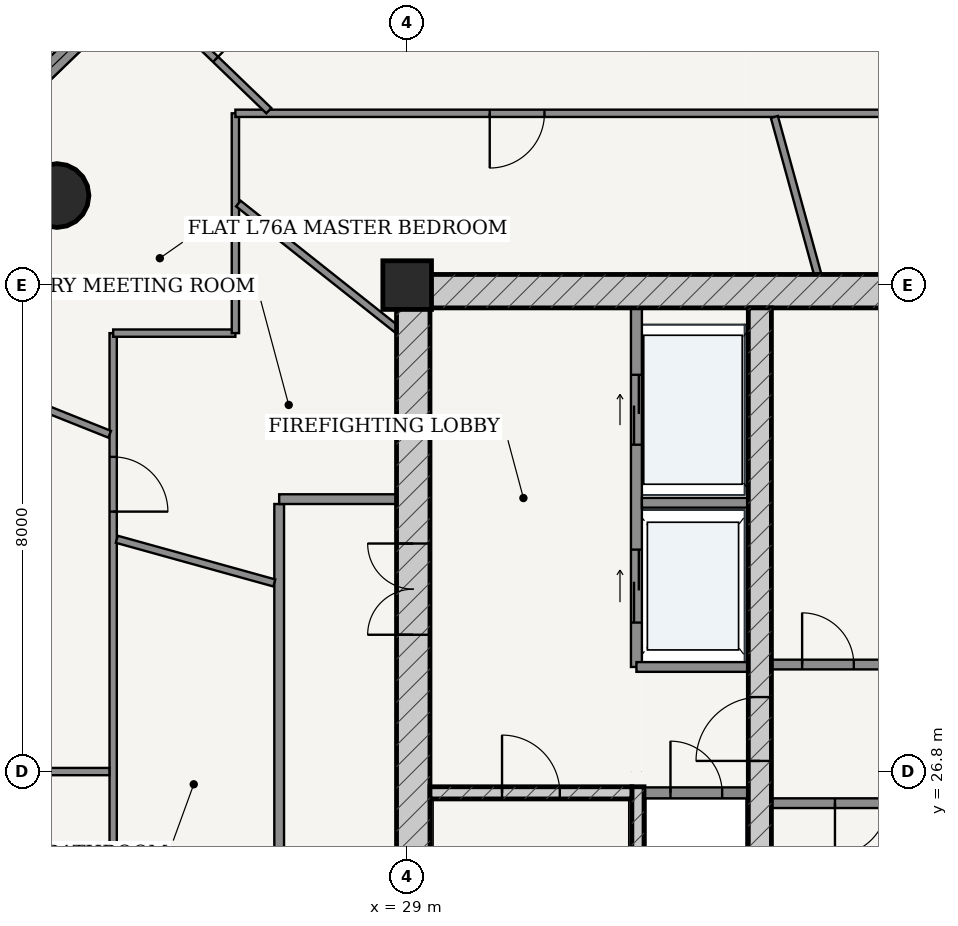
"""IFC4 building model, lengths in metres.
Left out: names, types, materials, properties, quantities, classifications, styles, units other than length and angle.
Written with IfcOpenShell. Run it as: python <this file> out.ifc"""

import sys

from ifc_helpers import new_model, si_unit, direction, frame, frame_2d, origin, origin_2d, place, context, subcontext, project, spatial, rectangle, hollow_circle, extrude, source, transform, mapped, element, fill, save


model = new_model("IFC4")
c1 = context("Model", 3, precision=1e-05, world=origin(), true_north=direction((-0.2419218956, 0.970295726276)))
c2 = subcontext(c1, "Body", "Model", "MODEL_VIEW")
j1 = project(units=[si_unit("LENGTHUNIT", "METRE"), si_unit("PLANEANGLEUNIT", "RADIAN")], contexts=[c1])
p1 = place(None, origin())
s1 = spatial("IfcSite", under=j1, at=p1, CompositionType="ELEMENT")
p2 = place(p1, origin())
s2 = spatial("IfcBuilding", under=s1, at=p2, CompositionType="ELEMENT")
p3 = place(p2, frame((0.0, 0.0, 289.45)))
s3 = spatial("IfcBuildingStorey", under=s2, at=p3, CompositionType="ELEMENT", Elevation=289.45)
p4 = place(p3, frame((29.0, 34.8, 0.0), z_axis=(0.0, 0.0, 1.0), x_axis=(1.0, 0.0, 0.0)))
e1 = element("IfcColumn", 1, at=p4, inside=s3, PredefinedType="COLUMN", context=c2, shape_type="SweptSolid", body=[
    extrude(rectangle(XDim=0.8, YDim=0.8, at=origin_2d()), origin(), (0.0, 0.0, 1.0), 3.75),
])
p5 = place(p3, frame((28.825, 34.7, 0.0), z_axis=(0.0, 0.0, 1.0), x_axis=(1.0, 0.0, 0.0)))
e2 = element("IfcWall", 2, at=p5, inside=s3, PredefinedType="SHEAR", context=c2, shape_type="SweptSolid", body=[
    extrude(rectangle(XDim=18.35, YDim=0.55, at=frame_2d((9.175, 0.0))), origin(), (0.0, 0.0, 1.0), 3.49),
])
p6 = place(p3, frame((29.1, 19.175, 0.0), z_axis=(0.0, 0.0, 1.0), x_axis=(0.0, 1.0, 0.0)))
e3 = element("IfcWall", 3, at=p6, inside=s3, PredefinedType="SHEAR", context=c2, shape_type="SweptSolid", body=[
    extrude(rectangle(XDim=15.25, YDim=0.55, at=frame_2d((7.625, 0.0))), origin(), (0.0, 0.0, 1.0), 3.49),
])
p7 = place(p6, frame((9.875, 0.0, 0.0)))
e4 = element("IfcOpeningElement", 4, at=p7, cuts=e3, PredefinedType="OPENING", context=c2, shape_type="SweptSolid", body=[
    extrude(rectangle(XDim=1.5, YDim=2.2, at=frame_2d((0.75, 1.1))), frame((0.0, 0.285, 0.0), z_axis=(0.0, -1.0, 0.0), x_axis=(1.0, 0.0, 0.0)), (0.0, 0.0, 1.0), 0.57),
])
p8 = place(p3, frame((32.795, 19.175, 0.0), z_axis=(0.0, 0.0, 1.0), x_axis=(0.0, 1.0, 0.0)))
e5 = element("IfcWall", 5, at=p8, inside=s3, PredefinedType="SOLIDWALL", context=c2, shape_type="SweptSolid", body=[
    extrude(rectangle(XDim=7.375, YDim=0.2, at=frame_2d((3.688, 0.0))), origin(), (0.0, 0.0, 1.0), 3.49),
])
p9 = place(p3, frame((29.375, 26.45, 0.0), z_axis=(0.0, 0.0, 1.0), x_axis=(1.0, 0.0, 0.0)))
e6 = element("IfcWall", 6, at=p9, inside=s3, PredefinedType="SOLIDWALL", context=c2, shape_type="SweptSolid", body=[
    extrude(rectangle(XDim=3.32, YDim=0.2, at=frame_2d((1.66, 0.0))), origin(), (0.0, 0.0, 1.0), 3.49),
])
p10 = place(p9, frame((1.185, 0.0, 0.0)))
e7 = element("IfcOpeningElement", 7, at=p10, cuts=e6, PredefinedType="OPENING", context=c2, shape_type="SweptSolid", body=[
    extrude(rectangle(XDim=0.95, YDim=2.15, at=frame_2d((0.475, 1.075))), frame((0.0, 0.11, 0.0), z_axis=(0.0, -1.0, 0.0), x_axis=(1.0, 0.0, 0.0)), (0.0, 0.0, 1.0), 0.22),
])
p11 = place(p3, frame((34.8, 19.175, 0.0), z_axis=(0.0, 0.0, 1.0), x_axis=(0.0, 1.0, 0.0)))
e8 = element("IfcWall", 8, at=p11, inside=s3, PredefinedType="SHEAR", context=c2, shape_type="SweptSolid", body=[
    extrude(rectangle(XDim=15.25, YDim=0.38, at=frame_2d((7.625, 0.0))), origin(), (0.0, 0.0, 1.0), 3.49),
])
p12 = place(p11, frame((7.8, 0.0, 0.0)))
e9 = element("IfcOpeningElement", 9, at=p12, cuts=e8, PredefinedType="OPENING", context=c2, shape_type="SweptSolid", body=[
    extrude(rectangle(XDim=1.05, YDim=2.15, at=frame_2d((0.525, 1.075))), frame((0.0, 0.2, 0.0), z_axis=(0.0, -1.0, 0.0), x_axis=(1.0, 0.0, 0.0)), (0.0, 0.0, 1.0), 0.4),
])
p13 = place(p3, frame((23.241, 36.272, 0.0), z_axis=(0.0, 0.0, 1.0), x_axis=(1.0, 0.0, 0.0)))
e10 = element("IfcColumn", 10, at=p13, inside=s3, PredefinedType="COLUMN", context=c2, shape_type="SweptSolid", body=[
    extrude(hollow_circle(Radius=0.525, WallThickness=0.035, at=origin_2d()), origin(), (0.0, 0.0, 1.0), 3.75),
])
p14 = place(p3, frame((27.296, 42.379, 0.0), z_axis=(0.0, 0.0, 1.0), x_axis=(-0.719979309073, -0.693995529169, 0.0)))
e11 = element("IfcWall", 11, at=p14, inside=s3, PredefinedType="SOLIDWALL", context=c2, shape_type="SweptSolid", body=[
    extrude(rectangle(XDim=7.583, YDim=0.28, at=frame_2d((3.791, 0.0))), origin(), (0.0, 0.0, 1.0), 3.49),
])
p15 = place(p14, frame((1.272, 0.0, 0.85)))
e12 = element("IfcOpeningElement", 12, at=p15, cuts=e11, PredefinedType="OPENING", context=c2, shape_type="SweptSolid", body=[
    extrude(rectangle(XDim=1.55, YDim=1.95, at=frame_2d((0.775, 0.975))), frame((0.0, 0.15, 0.0), z_axis=(0.0, -1.0, 0.0), x_axis=(1.0, 0.0, 0.0)), (0.0, 0.0, 1.0), 0.3),
])
p16 = place(p14, frame((4.76, 0.0, 0.85)))
e13 = element("IfcOpeningElement", 13, at=p16, cuts=e11, PredefinedType="OPENING", context=c2, shape_type="SweptSolid", body=[
    extrude(rectangle(XDim=1.55, YDim=1.95, at=frame_2d((0.775, 0.975))), frame((0.0, 0.15, 0.0), z_axis=(0.0, -1.0, 0.0), x_axis=(1.0, 0.0, 0.0)), (0.0, 0.0, 1.0), 0.3),
])
p17 = place(p3, frame((32.9, 26.45, 0.0), z_axis=(0.0, 0.0, 1.0), x_axis=(1.0, 0.0, 0.0)))
e14 = element("IfcWall", 14, at=p17, inside=s3, PredefinedType="PARTITIONING", context=c2, shape_type="SweptSolid", body=[
    extrude(rectangle(XDim=1.71, YDim=0.18, at=frame_2d((0.855, 0.0))), origin(), (0.0, 0.0, 1.0), 3.49),
])
p18 = place(p17, frame((0.43, 0.0, 0.0)))
e15 = element("IfcOpeningElement", 15, at=p18, cuts=e14, PredefinedType="OPENING", context=c2, shape_type="SweptSolid", body=[
    extrude(rectangle(XDim=0.85, YDim=2.1, at=frame_2d((0.425, 1.05))), frame((0.0, 0.1, 0.0), z_axis=(0.0, -1.0, 0.0), x_axis=(1.0, 0.0, 0.0)), (0.0, 0.0, 1.0), 0.2),
])
p19 = place(p3, frame((32.77, 28.52, 0.0), z_axis=(0.0, 0.0, 1.0), x_axis=(0.0, 1.0, 0.0)))
e16 = element("IfcWall", 16, at=p19, inside=s3, PredefinedType="PARTITIONING", context=c2, shape_type="SweptSolid", body=[
    extrude(rectangle(XDim=5.905, YDim=0.18, at=frame_2d((2.953, 0.0))), origin(), (0.0, 0.0, 1.0), 3.49),
])
p20 = place(p19, frame((3.655, 0.0, 0.0)))
e17 = element("IfcOpeningElement", 17, at=p20, cuts=e16, PredefinedType="OPENING", context=c2, shape_type="SweptSolid", body=[
    extrude(rectangle(XDim=1.15, YDim=2.2, at=frame_2d((0.575, 1.1))), frame((0.0, 0.1, 0.0), z_axis=(0.0, -1.0, 0.0), x_axis=(1.0, 0.0, 0.0)), (0.0, 0.0, 1.0), 0.2),
])
p21 = place(p19, frame((0.73, 0.0, 0.0)))
e18 = element("IfcOpeningElement", 18, at=p21, cuts=e16, PredefinedType="OPENING", context=c2, shape_type="SweptSolid", body=[
    extrude(rectangle(XDim=1.2, YDim=2.25, at=frame_2d((0.6, 1.125))), frame((0.0, 0.1, 0.0), z_axis=(0.0, -1.0, 0.0), x_axis=(1.0, 0.0, 0.0)), (0.0, 0.0, 1.0), 0.2),
])
p22 = place(p3, frame((32.86, 31.22, 0.0), z_axis=(0.0, 0.0, 1.0), x_axis=(1.0, 0.0, 0.0)))
e19 = element("IfcWall", 19, at=p22, inside=s3, PredefinedType="PARTITIONING", context=c2, shape_type="SweptSolid", body=[
    extrude(rectangle(XDim=1.75, YDim=0.16, at=frame_2d((0.875, 0.0))), origin(), (0.0, 0.0, 1.0), 3.49),
])
p23 = place(p3, frame((32.77, 28.52, 0.0), z_axis=(0.0, 0.0, 1.0), x_axis=(1.0, 0.0, 0.0)))
e20 = element("IfcWall", 20, at=p23, inside=s3, PredefinedType="PARTITIONING", context=c2, shape_type="SweptSolid", body=[
    extrude(rectangle(XDim=1.84, YDim=0.16, at=frame_2d((0.92, 0.0))), origin(), (0.0, 0.0, 1.0), 3.49),
])
p24 = place(p3, frame((34.99, 28.56, 0.0), z_axis=(0.0, 0.0, 1.0), x_axis=(1.0, 0.0, 0.0)))
e21 = element("IfcWall", 21, at=p24, inside=s3, PredefinedType="PARTITIONING", context=c2, shape_type="SweptSolid", body=[
    extrude(rectangle(XDim=6.02, YDim=0.16, at=frame_2d((3.01, 0.0))), origin(), (0.0, 0.0, 1.0), 3.49),
])
p25 = place(p24, frame((0.505, 0.0, 0.0)))
e22 = element("IfcOpeningElement", 22, at=p25, cuts=e21, PredefinedType="OPENING", context=c2, shape_type="SweptSolid", body=[
    extrude(rectangle(XDim=0.85, YDim=2.1, at=frame_2d((0.425, 1.05))), frame((0.0, 0.09, 0.0), z_axis=(0.0, -1.0, 0.0), x_axis=(1.0, 0.0, 0.0)), (0.0, 0.0, 1.0), 0.18),
])
p26 = place(p24, frame((2.58, 0.0, 0.0)))
e23 = element("IfcOpeningElement", 23, at=p26, cuts=e21, PredefinedType="OPENING", context=c2, shape_type="SweptSolid", body=[
    extrude(rectangle(XDim=0.86, YDim=2.1, at=frame_2d((0.43, 1.05))), frame((0.0, 0.09, 0.0), z_axis=(0.0, -1.0, 0.0), x_axis=(1.0, 0.0, 0.0)), (0.0, 0.0, 1.0), 0.18),
])
p27 = place(p24, frame((4.665, 0.0, 0.0)))
e24 = element("IfcOpeningElement", 24, at=p27, cuts=e21, PredefinedType="OPENING", context=c2, shape_type="SweptSolid", body=[
    extrude(rectangle(XDim=0.85, YDim=2.1, at=frame_2d((0.425, 1.05))), frame((0.0, 0.09, 0.0), z_axis=(0.0, -1.0, 0.0), x_axis=(1.0, 0.0, 0.0)), (0.0, 0.0, 1.0), 0.18),
])
p28 = place(p3, frame((34.99, 26.28, 0.0), z_axis=(0.0, 0.0, 1.0), x_axis=(1.0, 0.0, 0.0)))
e25 = element("IfcWall", 25, at=p28, inside=s3, PredefinedType="PARTITIONING", context=c2, shape_type="SweptSolid", body=[
    extrude(rectangle(XDim=6.02, YDim=0.16, at=frame_2d((3.01, 0.0))), origin(), (0.0, 0.0, 1.0), 3.49),
])
p29 = place(p28, frame((1.045, 0.0, 0.0)))
e26 = element("IfcOpeningElement", 26, at=p29, cuts=e25, PredefinedType="OPENING", context=c2, shape_type="SweptSolid", body=[
    extrude(rectangle(XDim=0.85, YDim=2.1, at=frame_2d((0.425, 1.05))), frame((0.0, 0.09, 0.0), z_axis=(0.0, -1.0, 0.0), x_axis=(1.0, 0.0, 0.0)), (0.0, 0.0, 1.0), 0.18),
])
p30 = place(p28, frame((3.215, 0.0, 0.0)))
e27 = element("IfcOpeningElement", 27, at=p30, cuts=e25, PredefinedType="OPENING", context=c2, shape_type="SweptSolid", body=[
    extrude(rectangle(XDim=1.1, YDim=2.2, at=frame_2d((0.55, 1.1))), frame((0.0, 0.09, 0.0), z_axis=(0.0, -1.0, 0.0), x_axis=(1.0, 0.0, 0.0)), (0.0, 0.0, 1.0), 0.18),
])
p31 = place(p28, frame((4.695, 0.0, 0.0)))
e28 = element("IfcOpeningElement", 28, at=p31, cuts=e25, PredefinedType="OPENING", context=c2, shape_type="SweptSolid", body=[
    extrude(rectangle(XDim=1.1, YDim=2.2, at=frame_2d((0.55, 1.1))), frame((0.0, 0.09, 0.0), z_axis=(0.0, -1.0, 0.0), x_axis=(1.0, 0.0, 0.0)), (0.0, 0.0, 1.0), 0.18),
])
p32 = place(p3, frame((26.895, 17.275, 0.0), z_axis=(0.0, 0.0, 1.0), x_axis=(0.0, 1.0, 0.0)))
e29 = element("IfcWall", 29, at=p32, inside=s3, PredefinedType="PARTITIONING", context=c2, shape_type="SweptSolid", body=[
    extrude(rectangle(XDim=13.925, YDim=0.16, at=frame_2d((6.962, 0.0))), origin(), (0.0, 0.0, 1.0), 3.015),
])
p33 = place(p32, frame((2.321, 0.0, 0.0)))
e30 = element("IfcOpeningElement", 30, at=p33, cuts=e29, PredefinedType="OPENING", context=c2, shape_type="SweptSolid", body=[
    extrude(rectangle(XDim=0.98, YDim=2.2, at=frame_2d((0.49, 1.1))), frame((0.0, 0.09, 0.0), z_axis=(0.0, -1.0, 0.0), x_axis=(1.0, 0.0, 0.0)), (0.0, 0.0, 1.0), 0.18),
])
p34 = place(p3, frame((26.895, 31.28, 0.0), z_axis=(0.0, 0.0, 1.0), x_axis=(1.0, 0.0, 0.0)))
e31 = element("IfcWall", 31, at=p34, inside=s3, PredefinedType="PARTITIONING", context=c2, shape_type="SweptSolid", body=[
    extrude(rectangle(XDim=1.93, YDim=0.16, at=frame_2d((0.965, 0.0))), origin(), (0.0, 0.0, 1.0), 3.49),
])
p35 = place(p3, frame((24.165, 14.465, 0.0), z_axis=(0.0, 0.0, 1.0), x_axis=(0.0, 1.0, 0.0)))
e32 = element("IfcWall", 32, at=p35, inside=s3, PredefinedType="PARTITIONING", context=c2, shape_type="SweptSolid", body=[
    extrude(rectangle(XDim=19.545, YDim=0.12, at=frame_2d((9.772, 0.0))), origin(), (0.0, 0.0, 1.0), 3.015),
])
p36 = place(p35, frame((4.875, 0.0, 0.0)))
e33 = element("IfcOpeningElement", 33, at=p36, cuts=e32, PredefinedType="OPENING", context=c2, shape_type="SweptSolid", body=[
    extrude(rectangle(XDim=0.9, YDim=2.15, at=frame_2d((0.45, 1.075))), frame((0.0, 0.07, 0.0), z_axis=(0.0, -1.0, 0.0), x_axis=(1.0, 0.0, 0.0)), (0.0, 0.0, 1.0), 0.14),
])
p37 = place(p35, frame((16.61, 0.0, 0.0)))
e34 = element("IfcOpeningElement", 34, at=p37, cuts=e32, PredefinedType="OPENING", context=c2, shape_type="SweptSolid", body=[
    extrude(rectangle(XDim=0.9, YDim=2.15, at=frame_2d((0.45, 1.075))), frame((0.0, 0.07, 0.0), z_axis=(0.0, -1.0, 0.0), x_axis=(1.0, 0.0, 0.0)), (0.0, 0.0, 1.0), 0.14),
])
p38 = place(p3, frame((24.165, 34.01, 0.0), z_axis=(0.0, 0.0, 1.0), x_axis=(1.0, 0.0, 0.0)))
e35 = element("IfcWall", 35, at=p38, inside=s3, PredefinedType="PARTITIONING", context=c2, shape_type="SweptSolid", body=[
    extrude(rectangle(XDim=2.01, YDim=0.12, at=frame_2d((1.005, 0.0))), origin(), (0.0, 0.0, 1.0), 3.209),
])
p39 = place(p3, frame((26.175, 34.01, 0.0), z_axis=(0.0, 0.0, 1.0), x_axis=(0.0, 1.0, 0.0)))
e36 = element("IfcWall", 36, at=p39, inside=s3, PredefinedType="PARTITIONING", context=c2, shape_type="SweptSolid", body=[
    extrude(rectangle(XDim=3.615, YDim=0.12, at=frame_2d((1.808, 0.0))), origin(), (0.0, 0.0, 1.0), 3.015),
])
p40 = place(p3, frame((26.175, 37.625, 0.0), z_axis=(0.0, 0.0, 1.0), x_axis=(1.0, 0.0, 0.0)))
e37 = element("IfcWall", 37, at=p40, inside=s3, PredefinedType="PARTITIONING", context=c2, shape_type="SweptSolid", body=[
    extrude(rectangle(XDim=13.957, YDim=0.12, at=frame_2d((6.979, 0.0))), origin(), (0.0, 0.0, 1.0), 3.015),
])
p41 = place(p40, frame((10.852, 0.0, 0.0)))
e38 = element("IfcOpeningElement", 38, at=p41, cuts=e37, PredefinedType="OPENING", context=c2, shape_type="SweptSolid", body=[
    extrude(rectangle(XDim=0.86, YDim=2.15, at=frame_2d((0.43, 1.075))), frame((0.0, 0.07, 0.0), z_axis=(0.0, -1.0, 0.0), x_axis=(1.0, 0.0, 0.0)), (0.0, 0.0, 1.0), 0.14),
])
p42 = place(p40, frame((4.183, 0.0, 0.0)))
e39 = element("IfcOpeningElement", 39, at=p42, cuts=e37, PredefinedType="OPENING", context=c2, shape_type="SweptSolid", body=[
    extrude(rectangle(XDim=0.9, YDim=2.15, at=frame_2d((0.45, 1.075))), frame((0.0, 0.07, 0.0), z_axis=(0.0, -1.0, 0.0), x_axis=(1.0, 0.0, 0.0)), (0.0, 0.0, 1.0), 0.14),
])
p43 = place(p3, frame((26.725, 37.668, 0.0), z_axis=(0.0, 0.0, 1.0), x_axis=(-0.719954096891, 0.694021684366, 0.0)))
e40 = element("IfcWall", 40, at=p43, inside=s3, PredefinedType="PARTITIONING", context=c2, shape_type="SweptSolid", body=[
    extrude(rectangle(XDim=3.333, YDim=0.12, at=frame_2d((1.667, 0.0))), origin(), (0.0, 0.0, 1.0), 3.121),
])
p44 = place(p43, frame((1.216, 0.0, 0.0)))
e41 = element("IfcOpeningElement", 41, at=p44, cuts=e40, PredefinedType="OPENING", context=c2, shape_type="SweptSolid", body=[
    extrude(rectangle(XDim=0.9, YDim=2.15, at=frame_2d((0.45, 1.075))), frame((0.0, 0.07, 0.0), z_axis=(0.0, -1.0, 0.0), x_axis=(1.0, 0.0, 0.0)), (0.0, 0.0, 1.0), 0.14),
])
p45 = place(p3, frame((24.107, 32.347, 0.0), z_axis=(0.0, 0.0, 1.0), x_axis=(-0.928712556691, 0.370800467966, 0.0)))
e42 = element("IfcWall", 42, at=p45, inside=s3, PredefinedType="PARTITIONING", context=c2, shape_type="SweptSolid", body=[
    extrude(rectangle(XDim=4.28, YDim=0.12, at=frame_2d((2.14, 0.0))), origin(), (0.0, 0.0, 1.0), 3.121),
])
p46 = place(p45, frame((1.69, 0.0, 0.0)))
e43 = element("IfcOpeningElement", 43, at=p46, cuts=e42, PredefinedType="OPENING", context=c2, shape_type="SweptSolid", body=[
    extrude(rectangle(XDim=0.9, YDim=2.15, at=frame_2d((0.45, 1.075))), frame((0.0, 0.07, 0.0), z_axis=(0.0, -1.0, 0.0), x_axis=(1.0, 0.0, 0.0)), (0.0, 0.0, 1.0), 0.14),
])
p47 = place(p3, frame((24.103, 26.8, 0.0), z_axis=(0.0, 0.0, 1.0), x_axis=(-1.0, 0.0, 0.0)))
e44 = element("IfcWall", 44, at=p47, inside=s3, PredefinedType="PARTITIONING", context=c2, shape_type="SweptSolid", body=[
    extrude(rectangle(XDim=5.443, YDim=0.12, at=frame_2d((2.722, 0.0))), origin(), (0.0, 0.0, 1.0), 3.121),
])
p48 = place(p47, frame((2.271, 0.0, 0.0)))
e45 = element("IfcOpeningElement", 45, at=p48, cuts=e44, PredefinedType="OPENING", context=c2, shape_type="SweptSolid", body=[
    extrude(rectangle(XDim=0.9, YDim=2.15, at=frame_2d((0.45, 1.075))), frame((0.0, 0.07, 0.0), z_axis=(0.0, -1.0, 0.0), x_axis=(1.0, 0.0, 0.0)), (0.0, 0.0, 1.0), 0.14),
])
p49 = place(p3, frame((35.751, 34.977, 0.0), z_axis=(0.0, 0.0, 1.0), x_axis=(-0.26521778697, 0.964188532122, 0.0)))
e46 = element("IfcWall", 46, at=p49, inside=s3, PredefinedType="PARTITIONING", context=c2, shape_type="SweptSolid", body=[
    extrude(rectangle(XDim=2.684, YDim=0.12, at=frame_2d((1.342, 0.0))), origin(), (0.0, 0.0, 1.0), 2.575),
])
p50 = place(p3, frame((28.825, 34.077, 0.0), z_axis=(0.0, 0.0, 1.0), x_axis=(-0.783444596274, 0.621461635637, 0.0)))
e47 = element("IfcWall", 47, at=p50, inside=s3, PredefinedType="PARTITIONING", context=c2, shape_type="SweptSolid", body=[
    extrude(rectangle(XDim=3.32, YDim=0.12, at=frame_2d((1.66, 0.0))), origin(), (0.0, 0.0, 1.0), 3.209),
])
p51 = place(p3, frame((26.815, 29.902, 0.0), z_axis=(0.0, 0.0, 1.0), x_axis=(-0.963610243268, 0.267311240073, 0.0)))
e48 = element("IfcWall", 48, at=p51, inside=s3, PredefinedType="PARTITIONING", context=c2, shape_type="SweptSolid", body=[
    extrude(rectangle(XDim=2.688, YDim=0.12, at=frame_2d((1.344, 0.0))), origin(), (0.0, 0.0, 1.0), 3.209),
])
m1 = source(origin(), c2, "Body", "SweptSolid", [
    extrude(rectangle(XDim=1.55, YDim=1.95, at=frame_2d((0.775, 0.975))), frame((0.0, 0.03, 0.0), z_axis=(0.0, -1.0, 0.0), x_axis=(1.0, 0.0, 0.0)), (0.0, 0.0, 1.0), 0.06),
])
p52 = place(p16, origin())
e49 = element("IfcWindow", 49, at=p52, inside=s3, PartitioningType="SINGLE_PANEL", PredefinedType="WINDOW", context=c2, shape_type="MappedRepresentation", body=[
    mapped(m1, transform((0.0, 0.0, 0.0), scale=1.0)),
])
fill(e13, e49)
m2 = source(origin(), c2, "Body", "SweptSolid", [
    extrude(rectangle(XDim=1.5, YDim=2.2, at=frame_2d((0.75, 1.1))), frame((0.0, 0.025, 0.0), z_axis=(0.0, -1.0, 0.0), x_axis=(1.0, 0.0, 0.0)), (0.0, 0.0, 1.0), 0.05),
])
p53 = place(p7, origin())
e50 = element("IfcDoor", 50, at=p53, inside=s3, OperationType="DOUBLE_DOOR_SINGLE_SWING", PredefinedType="DOOR", context=c2, shape_type="MappedRepresentation", body=[
    mapped(m2, transform((0.0, 0.0, 0.0), scale=1.0)),
])
fill(e4, e50)
m3 = source(origin(), c2, "Body", "SweptSolid", [
    extrude(rectangle(XDim=1.05, YDim=2.15, at=frame_2d((0.525, 1.075))), frame((0.0, 0.025, 0.0), z_axis=(0.0, -1.0, 0.0), x_axis=(1.0, 0.0, 0.0)), (0.0, 0.0, 1.0), 0.05),
])
p54 = place(p12, origin())
e51 = element("IfcDoor", 51, at=p54, inside=s3, OperationType="SINGLE_SWING_LEFT", PredefinedType="DOOR", context=c2, shape_type="MappedRepresentation", body=[
    mapped(m3, transform((0.0, 0.0, 0.0), scale=1.0)),
])
fill(e9, e51)
m4 = source(origin(), c2, "Body", "SweptSolid", [
    extrude(rectangle(XDim=0.95, YDim=2.15, at=frame_2d((0.475, 1.075))), frame((0.0, 0.025, 0.0), z_axis=(0.0, -1.0, 0.0), x_axis=(1.0, 0.0, 0.0)), (0.0, 0.0, 1.0), 0.05),
])
p55 = place(p10, origin())
e52 = element("IfcDoor", 52, at=p55, inside=s3, OperationType="SINGLE_SWING_LEFT", PredefinedType="DOOR", context=c2, shape_type="MappedRepresentation", body=[
    mapped(m4, transform((0.0, 0.0, 0.0), scale=1.0)),
])
fill(e7, e52)
m5 = source(origin(), c2, "Body", "SweptSolid", [
    extrude(rectangle(XDim=0.85, YDim=2.1, at=frame_2d((0.425, 1.05))), frame((0.0, 0.025, 0.0), z_axis=(0.0, -1.0, 0.0), x_axis=(1.0, 0.0, 0.0)), (0.0, 0.0, 1.0), 0.05),
])
p56 = place(p18, origin())
e53 = element("IfcDoor", 53, at=p56, inside=s3, OperationType="SINGLE_SWING_LEFT", PredefinedType="DOOR", context=c2, shape_type="MappedRepresentation", body=[
    mapped(m5, transform((0.0, 0.0, 0.0), scale=1.0)),
])
fill(e15, e53)
p57 = place(p25, origin())
e54 = element("IfcDoor", 54, at=p57, inside=s3, OperationType="SINGLE_SWING_LEFT", PredefinedType="DOOR", context=c2, shape_type="MappedRepresentation", body=[
    mapped(m5, transform((0.0, 0.0, 0.0), scale=1.0)),
])
fill(e22, e54)
p58 = place(p29, frame((0.85, 0.0, 0.0), z_axis=(0.0, 0.0, 1.0), x_axis=(-1.0, 0.0, 0.0)))
e55 = element("IfcDoor", 55, at=p58, inside=s3, OperationType="SINGLE_SWING_RIGHT", PredefinedType="DOOR", context=c2, shape_type="MappedRepresentation", body=[
    mapped(m5, transform((0.0, 0.0, 0.0), scale=1.0)),
])
fill(e26, e55)
m6 = source(origin(), c2, "Body", "SweptSolid", [
    extrude(rectangle(XDim=1.15, YDim=2.2, at=frame_2d((0.575, 1.1))), frame((0.0, 0.025, 0.0), z_axis=(0.0, -1.0, 0.0), x_axis=(1.0, 0.0, 0.0)), (0.0, 0.0, 1.0), 0.05),
])
p59 = place(p20, origin())
e56 = element("IfcDoor", 56, at=p59, inside=s3, OperationType="DOUBLE_DOOR_SLIDING", PredefinedType="DOOR", context=c2, shape_type="MappedRepresentation", body=[
    mapped(m6, transform((0.0, 0.0, 0.0), scale=1.0)),
])
fill(e17, e56)
m7 = source(origin(), c2, "Body", "SweptSolid", [
    extrude(rectangle(XDim=1.2, YDim=2.25, at=frame_2d((0.6, 1.125))), frame((0.0, 0.025, 0.0), z_axis=(0.0, -1.0, 0.0), x_axis=(1.0, 0.0, 0.0)), (0.0, 0.0, 1.0), 0.05),
])
p60 = place(p21, origin())
e57 = element("IfcDoor", 57, at=p60, inside=s3, OperationType="DOUBLE_DOOR_SLIDING", PredefinedType="DOOR", context=c2, shape_type="MappedRepresentation", body=[
    mapped(m7, transform((0.0, 0.0, 0.0), scale=1.0)),
])
fill(e18, e57)
m8 = source(origin(), c2, "Body", "SweptSolid", [
    extrude(rectangle(XDim=0.9, YDim=2.15, at=frame_2d((0.45, 1.075))), frame((0.0, 0.025, 0.0), z_axis=(0.0, -1.0, 0.0), x_axis=(1.0, 0.0, 0.0)), (0.0, 0.0, 1.0), 0.05),
])
p61 = place(p37, frame((0.9, 0.0, 0.0), z_axis=(0.0, 0.0, 1.0), x_axis=(-1.0, 0.0, 0.0)))
e58 = element("IfcDoor", 58, at=p61, inside=s3, OperationType="SINGLE_SWING_RIGHT", PredefinedType="DOOR", context=c2, shape_type="MappedRepresentation", body=[
    mapped(m8, transform((0.0, 0.0, 0.0), scale=1.0)),
])
fill(e34, e58)
p62 = place(p44, frame((0.9, 0.0, 0.0), z_axis=(0.0, 0.0, 1.0), x_axis=(-1.0, 0.0, 0.0)))
e59 = element("IfcDoor", 59, at=p62, inside=s3, OperationType="SINGLE_SWING_RIGHT", PredefinedType="DOOR", context=c2, shape_type="MappedRepresentation", body=[
    mapped(m8, transform((0.0, 0.0, 0.0), scale=1.0)),
])
fill(e41, e59)
p63 = place(p42, frame((0.9, 0.0, 0.0), z_axis=(0.0, 0.0, 1.0), x_axis=(-1.0, 0.0, 0.0)))
e60 = element("IfcDoor", 60, at=p63, inside=s3, OperationType="SINGLE_SWING_RIGHT", PredefinedType="DOOR", context=c2, shape_type="MappedRepresentation", body=[
    mapped(m8, transform((0.0, 0.0, 0.0), scale=1.0)),
])
fill(e39, e60)
save(model, sys.argv[1])
